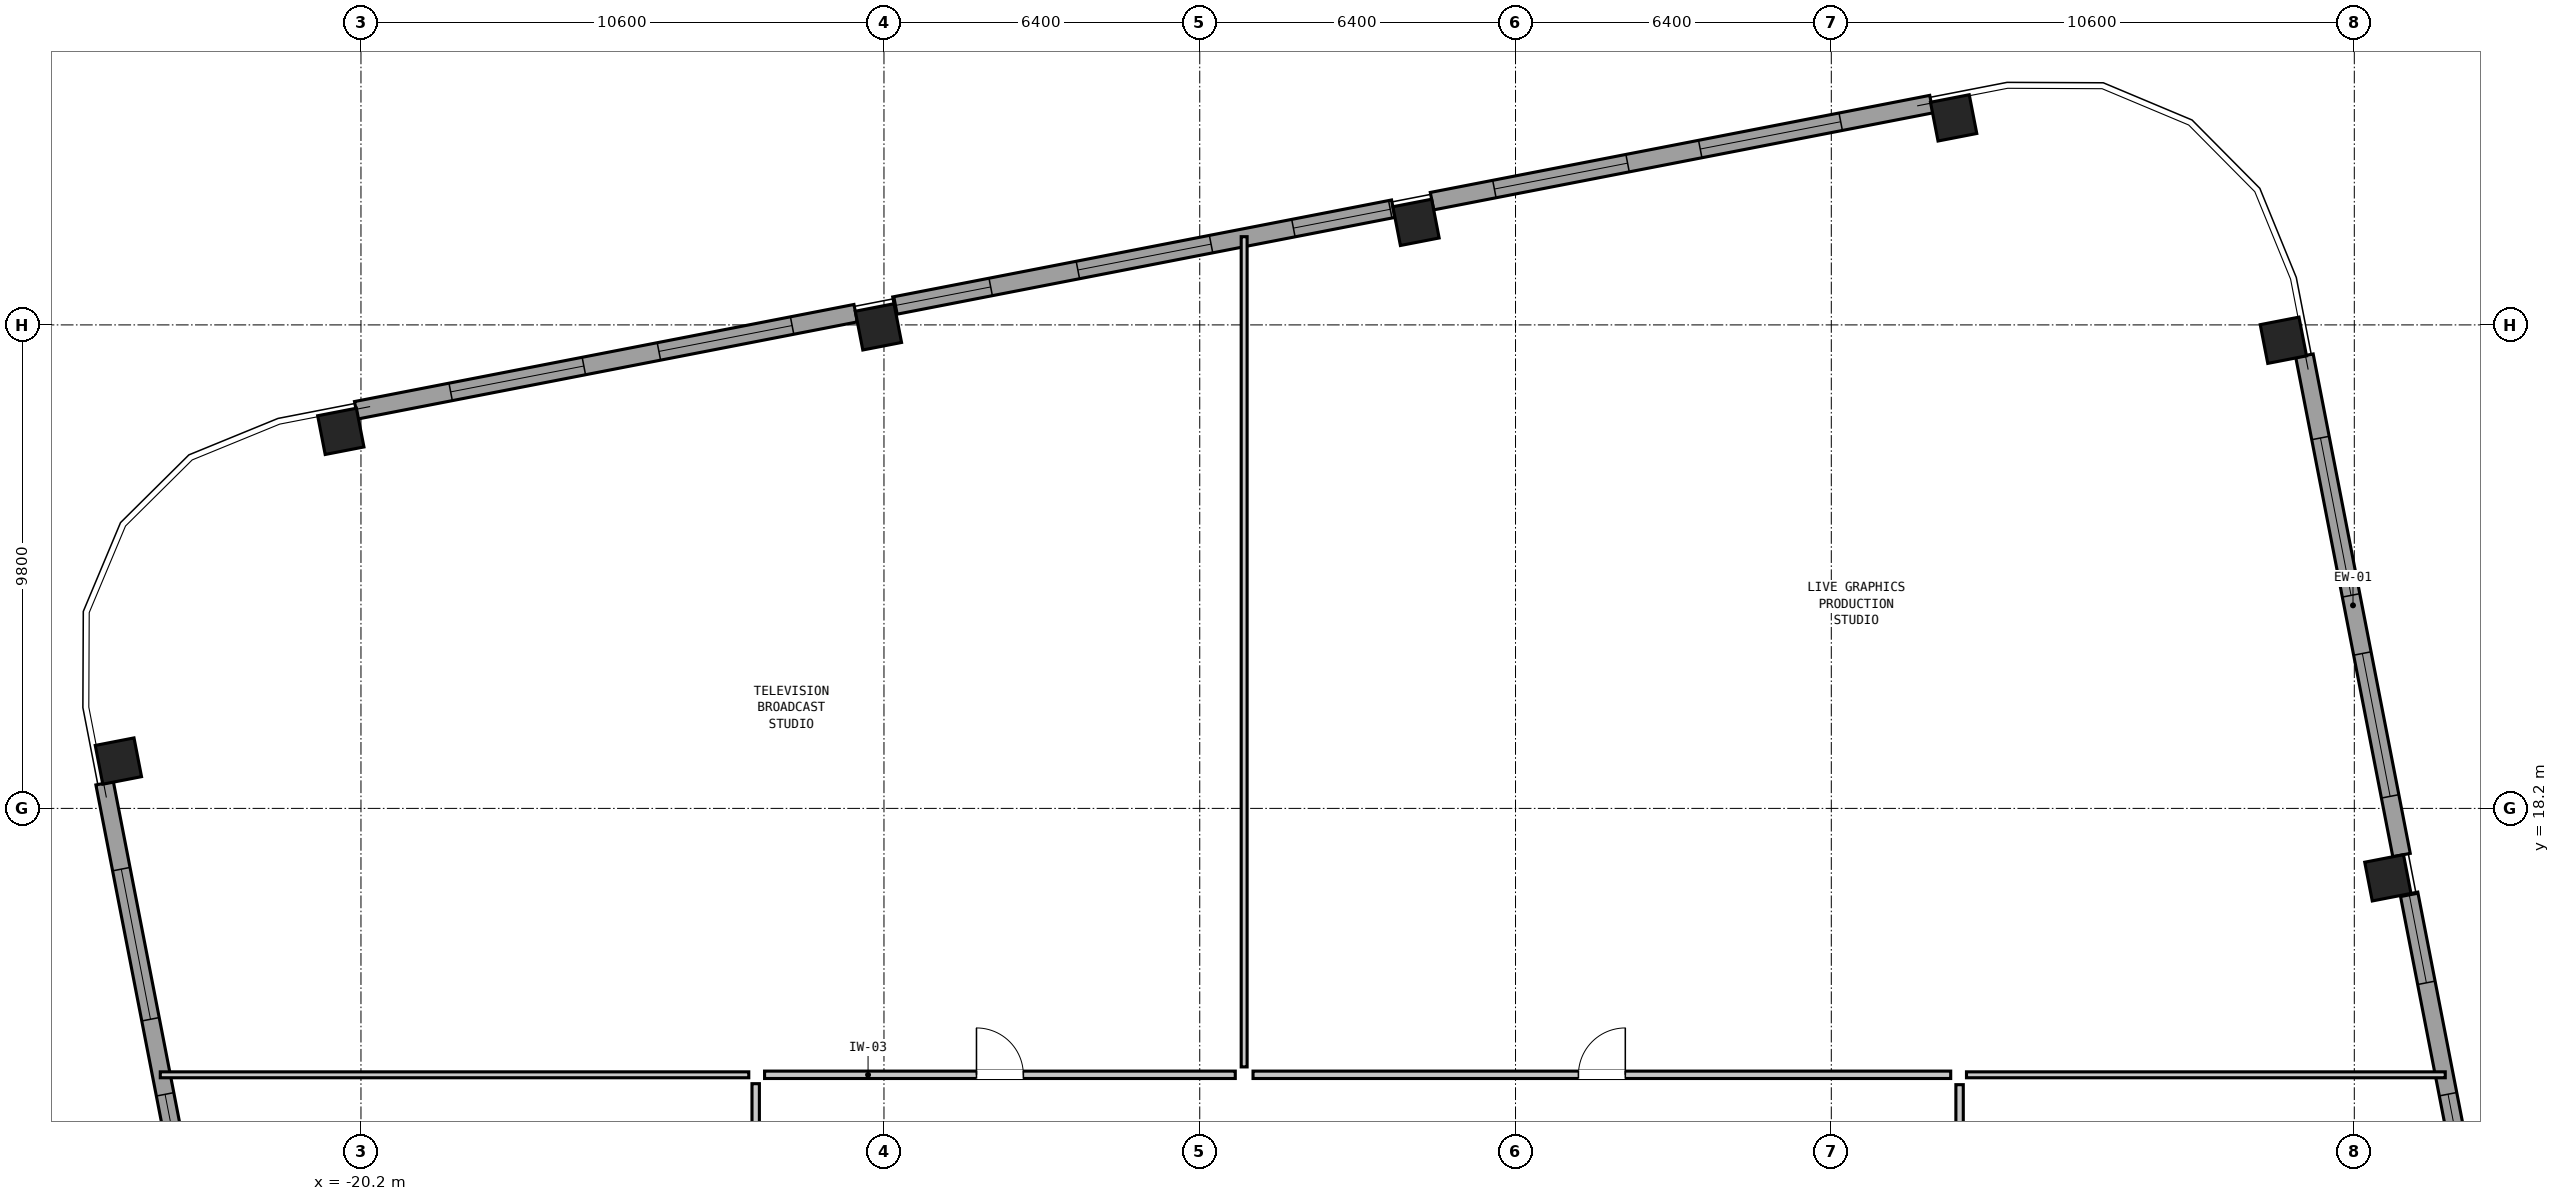
"""IFC4 building model, lengths in metres.
Left out: names, types, materials, properties, quantities, classifications, styles, units other than length and angle.
Written with IfcOpenShell. Run it as: python <this file> out.ifc"""

import sys

from ifc_helpers import new_model, si_unit, direction, frame, frame_2d, origin, origin_2d, place, context, subcontext, project, spatial, rectangle, hollow_rectangle, extrude, element, fill, save


model = new_model("IFC4")
c1 = context("Model", 3, precision=1e-05, world=origin(), true_north=direction((0.0, 1.0)))
c2 = subcontext(c1, "Body", "Model", "MODEL_VIEW")
j1 = project(units=[si_unit("LENGTHUNIT", "METRE"), si_unit("PLANEANGLEUNIT", "RADIAN")], contexts=[c1])
p1 = place(None, origin())
s1 = spatial("IfcSite", under=j1, at=p1, CompositionType="ELEMENT")
p2 = place(p1, origin())
s2 = spatial("IfcBuilding", under=s1, at=p2, CompositionType="ELEMENT")
p3 = place(p2, frame((0.0, 0.0, 115.85)))
s3 = spatial("IfcBuildingStorey", under=s2, at=p3, CompositionType="ELEMENT", Elevation=115.85)
for number, where, z_axis, x_axis in (
    (1, (20.88, 16.792, 0.0), (0.0, 0.0, 1.0), (-0.191, 0.982, 0.0)),
    (2, (18.762, 27.689, 0.0), (0.0, 0.0, 1.0), (-0.191, 0.982, 0.0)),
    (3, (12.08, 32.196, 0.0), (0.0, 0.0, 1.0), (0.982, 0.191, 0.0)),
    (4, (1.183, 30.078, 0.0), (0.0, 0.0, 1.0), (0.982, 0.191, 0.0)),
    (5, (-9.713, 27.96, 0.0), (0.0, 0.0, 1.0), (0.982, 0.191, 0.0)),
    (6, (-20.609, 25.842, 0.0), (0.0, 0.0, 1.0), (0.982, 0.191, 0.0)),
    (7, (-25.116, 19.159, 0.0), (0.0, 0.0, 1.0), (-0.191, 0.982, 0.0)),
):
    element("IfcColumn", number, at=place(p3, frame(where, z_axis=z_axis, x_axis=x_axis)), inside=s3, PredefinedType="COLUMN", context=c2, shape_type="SweptSolid", body=[
        extrude(hollow_rectangle(XDim=0.8, YDim=0.8, WallThickness=0.05, at=origin_2d()), origin(), (0.0, 0.0, 1.0), 3.05),
    ])
p4 = place(p3, frame((19.19, 27.376, 0.0), z_axis=(0.0, 0.0, 1.0), x_axis=(0.190822765986, -0.981624506612, 0.0)))
e8 = element("IfcWall", 8, at=p4, inside=s3, PredefinedType="SOLIDWALL", context=c2, shape_type="SweptSolid", body=[
    extrude(rectangle(XDim=10.312, YDim=0.36, at=frame_2d((5.156, 0.0))), origin(), (0.0, 0.0, 1.0), 2.067),
])
p5 = place(p4, frame((1.7, 0.0, 0.2)))
e9 = element("IfcOpeningElement", 9, at=p5, cuts=e8, PredefinedType="OPENING", context=c2, shape_type="SweptSolid", body=[
    extrude(rectangle(XDim=3.25, YDim=0.85, at=frame_2d((1.625, 0.425))), frame((0.0, 0.192, 0.0), z_axis=(0.0, -1.0, 0.0), x_axis=(1.0, 0.0, 0.0)), (0.0, 0.0, 1.0), 0.384),
])
p6 = place(p4, frame((6.15, 0.0, 0.95)))
e10 = element("IfcOpeningElement", 10, at=p6, cuts=e8, PredefinedType="OPENING", context=c2, shape_type="SweptSolid", body=[
    extrude(rectangle(XDim=2.95, YDim=0.95, at=frame_2d((1.475, 0.475))), frame((0.0, 0.192, 0.0), z_axis=(0.0, -1.0, 0.0), x_axis=(1.0, 0.0, 0.0)), (0.0, 0.0, 1.0), 0.384),
])
p7 = place(p3, frame((21.31, 16.469, 0.0), z_axis=(0.0, 0.0, 1.0), x_axis=(0.190811924826, -0.981626614016, 0.0)))
e11 = element("IfcWall", 11, at=p7, inside=s3, PredefinedType="SOLIDWALL", context=c2, shape_type="SweptSolid", body=[
    extrude(rectangle(XDim=10.3, YDim=0.36, at=frame_2d((5.15, 0.0))), origin(), (0.0, 0.0, 1.0), 2.067),
])
p8 = place(p7, frame((0.038, 0.0, 0.2)))
e12 = element("IfcOpeningElement", 12, at=p8, cuts=e11, PredefinedType="OPENING", context=c2, shape_type="SweptSolid", body=[
    extrude(rectangle(XDim=1.8, YDim=1.25, at=frame_2d((0.9, 0.625))), frame((0.0, 0.192, 0.0), z_axis=(0.0, -1.0, 0.0), x_axis=(1.0, 0.0, 0.0)), (0.0, 0.0, 1.0), 0.384),
])
p9 = place(p7, frame((4.138, 0.0, 0.7)))
e13 = element("IfcOpeningElement", 13, at=p9, cuts=e11, PredefinedType="OPENING", context=c2, shape_type="SweptSolid", body=[
    extrude(rectangle(XDim=2.1, YDim=1.2, at=frame_2d((1.05, 0.6))), frame((0.0, 0.192, 0.0), z_axis=(0.0, -1.0, 0.0), x_axis=(1.0, 0.0, 0.0)), (0.0, 0.0, 1.0), 0.384),
])
p10 = place(p7, frame((8.388, 0.0, 0.2)))
e14 = element("IfcOpeningElement", 14, at=p10, cuts=e11, PredefinedType="OPENING", context=c2, shape_type="SweptSolid", body=[
    extrude(rectangle(XDim=1.85, YDim=1.2, at=frame_2d((0.925, 0.6))), frame((0.0, 0.192, 0.0), z_axis=(0.0, -1.0, 0.0), x_axis=(1.0, 0.0, 0.0)), (0.0, 0.0, 1.0), 0.384),
])
p11 = place(p3, frame((-20.296, 26.27, 0.0), z_axis=(0.0, 0.0, 1.0), x_axis=(0.981628941133, 0.190799952646, 0.0)))
e15 = element("IfcWall", 15, at=p11, inside=s3, PredefinedType="SOLIDWALL", context=c2, shape_type="SweptSolid", body=[
    extrude(rectangle(XDim=10.312, YDim=0.36, at=frame_2d((5.156, 0.0))), origin(), (0.0, 0.0, 1.0), 2.067),
])
p12 = place(p11, frame((1.95, 0.0, 0.2)))
e16 = element("IfcOpeningElement", 16, at=p12, cuts=e15, PredefinedType="OPENING", context=c2, shape_type="SweptSolid", body=[
    extrude(rectangle(XDim=2.75, YDim=0.95, at=frame_2d((1.375, 0.475))), frame((0.0, 0.192, 0.0), z_axis=(0.0, -1.0, 0.0), x_axis=(1.0, 0.0, 0.0)), (0.0, 0.0, 1.0), 0.384),
])
p13 = place(p11, frame((6.25, 0.0, 0.95)))
e17 = element("IfcOpeningElement", 17, at=p13, cuts=e15, PredefinedType="OPENING", context=c2, shape_type="SweptSolid", body=[
    extrude(rectangle(XDim=2.75, YDim=0.95, at=frame_2d((1.375, 0.475))), frame((0.0, 0.192, 0.0), z_axis=(0.0, -1.0, 0.0), x_axis=(1.0, 0.0, 0.0)), (0.0, 0.0, 1.0), 0.384),
])
p14 = place(p3, frame((-9.389, 28.39, 0.0), z_axis=(0.0, 0.0, 1.0), x_axis=(0.981627477005, 0.190807485147, 0.0)))
e18 = element("IfcWall", 18, at=p14, inside=s3, PredefinedType="SOLIDWALL", context=c2, shape_type="SweptSolid", body=[
    extrude(rectangle(XDim=10.3, YDim=0.36, at=frame_2d((5.15, 0.0))), origin(), (0.0, 0.0, 1.0), 2.067),
])
p15 = place(p14, frame((0.038, 0.0, 0.2)))
e19 = element("IfcOpeningElement", 19, at=p15, cuts=e18, PredefinedType="OPENING", context=c2, shape_type="SweptSolid", body=[
    extrude(rectangle(XDim=1.95, YDim=1.1, at=frame_2d((0.975, 0.55))), frame((0.0, 0.192, 0.0), z_axis=(0.0, -1.0, 0.0), x_axis=(1.0, 0.0, 0.0)), (0.0, 0.0, 1.0), 0.384),
])
p16 = place(p14, frame((3.788, 0.0, 0.95)))
e20 = element("IfcOpeningElement", 20, at=p16, cuts=e18, PredefinedType="OPENING", context=c2, shape_type="SweptSolid", body=[
    extrude(rectangle(XDim=2.75, YDim=0.95, at=frame_2d((1.375, 0.475))), frame((0.0, 0.192, 0.0), z_axis=(0.0, -1.0, 0.0), x_axis=(1.0, 0.0, 0.0)), (0.0, 0.0, 1.0), 0.384),
])
p17 = place(p14, frame((8.238, 0.0, 0.2)))
e21 = element("IfcOpeningElement", 21, at=p17, cuts=e18, PredefinedType="OPENING", context=c2, shape_type="SweptSolid", body=[
    extrude(rectangle(XDim=2.0, YDim=1.05, at=frame_2d((1.0, 0.525))), frame((0.0, 0.192, 0.0), z_axis=(0.0, -1.0, 0.0), x_axis=(1.0, 0.0, 0.0)), (0.0, 0.0, 1.0), 0.384),
])
p18 = place(p3, frame((1.507, 30.508, 0.0), z_axis=(0.0, 0.0, 1.0), x_axis=(0.981628941133, 0.190799952646, 0.0)))
e22 = element("IfcWall", 22, at=p18, inside=s3, PredefinedType="SOLIDWALL", context=c2, shape_type="SweptSolid", body=[
    extrude(rectangle(XDim=10.312, YDim=0.36, at=frame_2d((5.156, 0.0))), origin(), (0.0, 0.0, 1.0), 2.067),
])
p19 = place(p18, frame((1.288, 0.0, 0.95)))
e23 = element("IfcOpeningElement", 23, at=p19, cuts=e22, PredefinedType="OPENING", context=c2, shape_type="SweptSolid", body=[
    extrude(rectangle(XDim=2.75, YDim=0.95, at=frame_2d((1.375, 0.475))), frame((0.0, 0.192, 0.0), z_axis=(0.0, -1.0, 0.0), x_axis=(1.0, 0.0, 0.0)), (0.0, 0.0, 1.0), 0.384),
])
p20 = place(p18, frame((5.538, 0.0, 0.2)))
e24 = element("IfcOpeningElement", 24, at=p20, cuts=e22, PredefinedType="OPENING", context=c2, shape_type="SweptSolid", body=[
    extrude(rectangle(XDim=2.9, YDim=0.9, at=frame_2d((1.45, 0.45))), frame((0.0, 0.192, 0.0), z_axis=(0.0, -1.0, 0.0), x_axis=(1.0, 0.0, 0.0)), (0.0, 0.0, 1.0), 0.384),
])
p21 = place(p3, frame((-23.428, 8.587, 0.0), z_axis=(0.0, 0.0, 1.0), x_axis=(-0.190822765986, 0.981624506612, 0.0)))
e25 = element("IfcWall", 25, at=p21, inside=s3, PredefinedType="SOLIDWALL", context=c2, shape_type="SweptSolid", body=[
    extrude(rectangle(XDim=10.312, YDim=0.36, at=frame_2d((5.156, 0.0))), origin(), (0.0, 0.0, 1.0), 2.067),
])
p22 = place(p21, frame((1.438, 0.0, 0.8)))
e26 = element("IfcOpeningElement", 26, at=p22, cuts=e25, PredefinedType="OPENING", context=c2, shape_type="SweptSolid", body=[
    extrude(rectangle(XDim=2.45, YDim=1.1, at=frame_2d((1.225, 0.55))), frame((0.0, 0.192, 0.0), z_axis=(0.0, -1.0, 0.0), x_axis=(1.0, 0.0, 0.0)), (0.0, 0.0, 1.0), 0.384),
])
p23 = place(p21, frame((5.438, 0.0, 0.2)))
e27 = element("IfcOpeningElement", 27, at=p23, cuts=e25, PredefinedType="OPENING", context=c2, shape_type="SweptSolid", body=[
    extrude(rectangle(XDim=3.1, YDim=0.9, at=frame_2d((1.55, 0.45))), frame((0.0, 0.192, 0.0), z_axis=(0.0, -1.0, 0.0), x_axis=(1.0, 0.0, 0.0)), (0.0, 0.0, 1.0), 0.384),
])
p24 = place(p3, frame((-24.267, 12.8, 0.0), z_axis=(0.0, 0.0, 1.0), x_axis=(1.0, 0.0, 0.0)))
e28 = element("IfcWall", 28, at=p24, inside=s3, PredefinedType="PARTITIONING", context=c2, shape_type="SweptSolid", body=[
    extrude(rectangle(XDim=11.927, YDim=0.12, at=frame_2d((5.964, 0.0))), origin(), (0.0, 0.0, 1.0), 2.83),
])
p25 = place(p3, frame((12.34, 12.8, 0.0), z_axis=(0.0, 0.0, 1.0), x_axis=(1.0, 0.0, 0.0)))
e29 = element("IfcWall", 29, at=p25, inside=s3, PredefinedType="PARTITIONING", context=c2, shape_type="SweptSolid", body=[
    extrude(rectangle(XDim=9.703, YDim=0.12, at=frame_2d((4.852, 0.0))), origin(), (0.0, 0.0, 1.0), 2.83),
])
p26 = place(p3, frame((-2.3, 12.96, 0.0), z_axis=(0.0, 0.0, 1.0), x_axis=(0.0, 1.0, 0.0)))
e30 = element("IfcWall", 30, at=p26, inside=s3, PredefinedType="PARTITIONING", context=c2, shape_type="SweptSolid", body=[
    extrude(rectangle(XDim=16.828, YDim=0.12, at=frame_2d((8.414, 0.0))), origin(), (0.0, 0.0, 1.0), 2.83),
])
p27 = place(p3, frame((-12.02, 12.8, 0.0), z_axis=(0.0, 0.0, 1.0), x_axis=(1.0, 0.0, 0.0)))
e31 = element("IfcWall", 31, at=p27, inside=s3, PredefinedType="PARTITIONING", context=c2, shape_type="SweptSolid", body=[
    extrude(rectangle(XDim=9.54, YDim=0.15, at=frame_2d((4.77, 0.0))), origin(), (0.0, 0.0, 1.0), 2.83),
])
p28 = place(p27, frame((4.295, 0.0, 0.0)))
e32 = element("IfcOpeningElement", 32, at=p28, cuts=e31, PredefinedType="OPENING", context=c2, shape_type="SweptSolid", body=[
    extrude(rectangle(XDim=0.95, YDim=2.1, at=frame_2d((0.475, 1.05))), frame((0.0, 0.087, 0.0), z_axis=(0.0, -1.0, 0.0), x_axis=(1.0, 0.0, 0.0)), (0.0, 0.0, 1.0), 0.174),
])
p29 = place(p3, frame((-2.12, 12.8, 0.0), z_axis=(0.0, 0.0, 1.0), x_axis=(1.0, 0.0, 0.0)))
e33 = element("IfcWall", 33, at=p29, inside=s3, PredefinedType="PARTITIONING", context=c2, shape_type="SweptSolid", body=[
    extrude(rectangle(XDim=14.14, YDim=0.15, at=frame_2d((7.07, 0.0))), origin(), (0.0, 0.0, 1.0), 2.83),
])
p30 = place(p29, frame((6.595, 0.0, 0.0)))
e34 = element("IfcOpeningElement", 34, at=p30, cuts=e33, PredefinedType="OPENING", context=c2, shape_type="SweptSolid", body=[
    extrude(rectangle(XDim=0.95, YDim=2.1, at=frame_2d((0.475, 1.05))), frame((0.0, 0.087, 0.0), z_axis=(0.0, -1.0, 0.0), x_axis=(1.0, 0.0, 0.0)), (0.0, 0.0, 1.0), 0.174),
])
p31 = place(p3, frame((-12.2, -11.42, 0.0), z_axis=(0.0, 0.0, 1.0), x_axis=(0.0, 1.0, 0.0)))
e35 = element("IfcWall", 35, at=p31, inside=s3, PredefinedType="PARTITIONING", context=c2, shape_type="SweptSolid", body=[
    extrude(rectangle(XDim=24.04, YDim=0.15, at=frame_2d((12.02, 0.0))), origin(), (0.0, 0.0, 1.0), 2.83),
])
p32 = place(p31, frame((11.545, 0.0, 0.0)))
e36 = element("IfcOpeningElement", 36, at=p32, cuts=e35, PredefinedType="OPENING", context=c2, shape_type="SweptSolid", body=[
    extrude(rectangle(XDim=0.95, YDim=2.1, at=frame_2d((0.475, 1.05))), frame((0.0, 0.087, 0.0), z_axis=(0.0, -1.0, 0.0), x_axis=(1.0, 0.0, 0.0)), (0.0, 0.0, 1.0), 0.174),
])
p33 = place(p3, frame((12.2, 3.8, 0.0), z_axis=(0.0, 0.0, 1.0), x_axis=(0.0, 1.0, 0.0)))
e37 = element("IfcWall", 37, at=p33, inside=s3, PredefinedType="PARTITIONING", context=c2, shape_type="SweptSolid", body=[
    extrude(rectangle(XDim=8.8, YDim=0.15, at=frame_2d((4.4, 0.0))), origin(), (0.0, 0.0, 1.0), 2.83),
])
p34 = place(p33, frame((3.925, 0.0, 0.0)))
e38 = element("IfcOpeningElement", 38, at=p34, cuts=e37, PredefinedType="OPENING", context=c2, shape_type="SweptSolid", body=[
    extrude(rectangle(XDim=0.95, YDim=2.1, at=frame_2d((0.475, 1.05))), frame((0.0, 0.087, 0.0), z_axis=(0.0, -1.0, 0.0), x_axis=(1.0, 0.0, 0.0)), (0.0, 0.0, 1.0), 0.174),
])
p35 = place(p5, origin())
e39 = element("IfcWindow", 39, at=p35, inside=s3, PartitioningType="SINGLE_PANEL", PredefinedType="WINDOW", context=c2, shape_type="SweptSolid", body=[
    extrude(rectangle(XDim=3.25, YDim=0.85, at=frame_2d((1.625, 0.425))), frame((0.0, 0.03, 0.0), z_axis=(0.0, -1.0, 0.0), x_axis=(1.0, 0.0, 0.0)), (0.0, 0.0, 1.0), 0.06),
])
fill(e9, e39)
p36 = place(p6, origin())
e40 = element("IfcWindow", 40, at=p36, inside=s3, PartitioningType="SINGLE_PANEL", PredefinedType="WINDOW", context=c2, shape_type="SweptSolid", body=[
    extrude(rectangle(XDim=2.95, YDim=0.95, at=frame_2d((1.475, 0.475))), frame((0.0, 0.03, 0.0), z_axis=(0.0, -1.0, 0.0), x_axis=(1.0, 0.0, 0.0)), (0.0, 0.0, 1.0), 0.06),
])
fill(e10, e40)
p37 = place(p8, origin())
e41 = element("IfcWindow", 41, at=p37, inside=s3, PartitioningType="SINGLE_PANEL", PredefinedType="WINDOW", context=c2, shape_type="SweptSolid", body=[
    extrude(rectangle(XDim=1.8, YDim=1.25, at=frame_2d((0.9, 0.625))), frame((0.0, 0.03, 0.0), z_axis=(0.0, -1.0, 0.0), x_axis=(1.0, 0.0, 0.0)), (0.0, 0.0, 1.0), 0.06),
])
fill(e12, e41)
p38 = place(p9, origin())
e42 = element("IfcWindow", 42, at=p38, inside=s3, PartitioningType="SINGLE_PANEL", PredefinedType="WINDOW", context=c2, shape_type="SweptSolid", body=[
    extrude(rectangle(XDim=2.1, YDim=1.2, at=frame_2d((1.05, 0.6))), frame((0.0, 0.03, 0.0), z_axis=(0.0, -1.0, 0.0), x_axis=(1.0, 0.0, 0.0)), (0.0, 0.0, 1.0), 0.06),
])
fill(e13, e42)
p39 = place(p12, origin())
e43 = element("IfcWindow", 43, at=p39, inside=s3, PartitioningType="SINGLE_PANEL", PredefinedType="WINDOW", context=c2, shape_type="SweptSolid", body=[
    extrude(rectangle(XDim=2.75, YDim=0.95, at=frame_2d((1.375, 0.475))), frame((0.0, 0.03, 0.0), z_axis=(0.0, -1.0, 0.0), x_axis=(1.0, 0.0, 0.0)), (0.0, 0.0, 1.0), 0.06),
])
fill(e16, e43)
p40 = place(p13, origin())
e44 = element("IfcWindow", 44, at=p40, inside=s3, PartitioningType="SINGLE_PANEL", PredefinedType="WINDOW", context=c2, shape_type="SweptSolid", body=[
    extrude(rectangle(XDim=2.75, YDim=0.95, at=frame_2d((1.375, 0.475))), frame((0.0, 0.03, 0.0), z_axis=(0.0, -1.0, 0.0), x_axis=(1.0, 0.0, 0.0)), (0.0, 0.0, 1.0), 0.06),
])
fill(e17, e44)
p41 = place(p15, origin())
e45 = element("IfcWindow", 45, at=p41, inside=s3, PartitioningType="SINGLE_PANEL", PredefinedType="WINDOW", context=c2, shape_type="SweptSolid", body=[
    extrude(rectangle(XDim=1.95, YDim=1.1, at=frame_2d((0.975, 0.55))), frame((0.0, 0.03, 0.0), z_axis=(0.0, -1.0, 0.0), x_axis=(1.0, 0.0, 0.0)), (0.0, 0.0, 1.0), 0.06),
])
fill(e19, e45)
p42 = place(p16, origin())
e46 = element("IfcWindow", 46, at=p42, inside=s3, PartitioningType="SINGLE_PANEL", PredefinedType="WINDOW", context=c2, shape_type="SweptSolid", body=[
    extrude(rectangle(XDim=2.75, YDim=0.95, at=frame_2d((1.375, 0.475))), frame((0.0, 0.03, 0.0), z_axis=(0.0, -1.0, 0.0), x_axis=(1.0, 0.0, 0.0)), (0.0, 0.0, 1.0), 0.06),
])
fill(e20, e46)
p43 = place(p17, origin())
e47 = element("IfcWindow", 47, at=p43, inside=s3, PartitioningType="SINGLE_PANEL", PredefinedType="WINDOW", context=c2, shape_type="SweptSolid", body=[
    extrude(rectangle(XDim=2.0, YDim=1.05, at=frame_2d((1.0, 0.525))), frame((0.0, 0.03, 0.0), z_axis=(0.0, -1.0, 0.0), x_axis=(1.0, 0.0, 0.0)), (0.0, 0.0, 1.0), 0.06),
])
fill(e21, e47)
p44 = place(p19, origin())
e48 = element("IfcWindow", 48, at=p44, inside=s3, PartitioningType="SINGLE_PANEL", PredefinedType="WINDOW", context=c2, shape_type="SweptSolid", body=[
    extrude(rectangle(XDim=2.75, YDim=0.95, at=frame_2d((1.375, 0.475))), frame((0.0, 0.03, 0.0), z_axis=(0.0, -1.0, 0.0), x_axis=(1.0, 0.0, 0.0)), (0.0, 0.0, 1.0), 0.06),
])
fill(e23, e48)
p45 = place(p20, origin())
e49 = element("IfcWindow", 49, at=p45, inside=s3, PartitioningType="SINGLE_PANEL", PredefinedType="WINDOW", context=c2, shape_type="SweptSolid", body=[
    extrude(rectangle(XDim=2.9, YDim=0.9, at=frame_2d((1.45, 0.45))), frame((0.0, 0.03, 0.0), z_axis=(0.0, -1.0, 0.0), x_axis=(1.0, 0.0, 0.0)), (0.0, 0.0, 1.0), 0.06),
])
fill(e24, e49)
p46 = place(p22, origin())
e50 = element("IfcWindow", 50, at=p46, inside=s3, PartitioningType="SINGLE_PANEL", PredefinedType="WINDOW", context=c2, shape_type="SweptSolid", body=[
    extrude(rectangle(XDim=2.45, YDim=1.1, at=frame_2d((1.225, 0.55))), frame((0.0, 0.03, 0.0), z_axis=(0.0, -1.0, 0.0), x_axis=(1.0, 0.0, 0.0)), (0.0, 0.0, 1.0), 0.06),
])
fill(e26, e50)
p47 = place(p23, origin())
e51 = element("IfcWindow", 51, at=p47, inside=s3, PartitioningType="SINGLE_PANEL", PredefinedType="WINDOW", context=c2, shape_type="SweptSolid", body=[
    extrude(rectangle(XDim=3.1, YDim=0.9, at=frame_2d((1.55, 0.45))), frame((0.0, 0.03, 0.0), z_axis=(0.0, -1.0, 0.0), x_axis=(1.0, 0.0, 0.0)), (0.0, 0.0, 1.0), 0.06),
])
fill(e27, e51)
p48 = place(p28, origin())
e52 = element("IfcDoor", 52, at=p48, inside=s3, OperationType="SINGLE_SWING_LEFT", PredefinedType="DOOR", context=c2, shape_type="SweptSolid", body=[
    extrude(rectangle(XDim=0.95, YDim=2.1, at=frame_2d((0.475, 1.05))), frame((0.0, 0.025, 0.0), z_axis=(0.0, -1.0, 0.0), x_axis=(1.0, 0.0, 0.0)), (0.0, 0.0, 1.0), 0.05),
])
fill(e32, e52)
p49 = place(p30, origin())
e53 = element("IfcDoor", 53, at=p49, inside=s3, OperationType="SINGLE_SWING_RIGHT", PredefinedType="DOOR", context=c2, shape_type="SweptSolid", body=[
    extrude(rectangle(XDim=0.95, YDim=2.1, at=frame_2d((0.475, 1.05))), frame((0.0, 0.025, 0.0), z_axis=(0.0, -1.0, 0.0), x_axis=(1.0, 0.0, 0.0)), (0.0, 0.0, 1.0), 0.05),
])
fill(e34, e53)
save(model, sys.argv[1])
